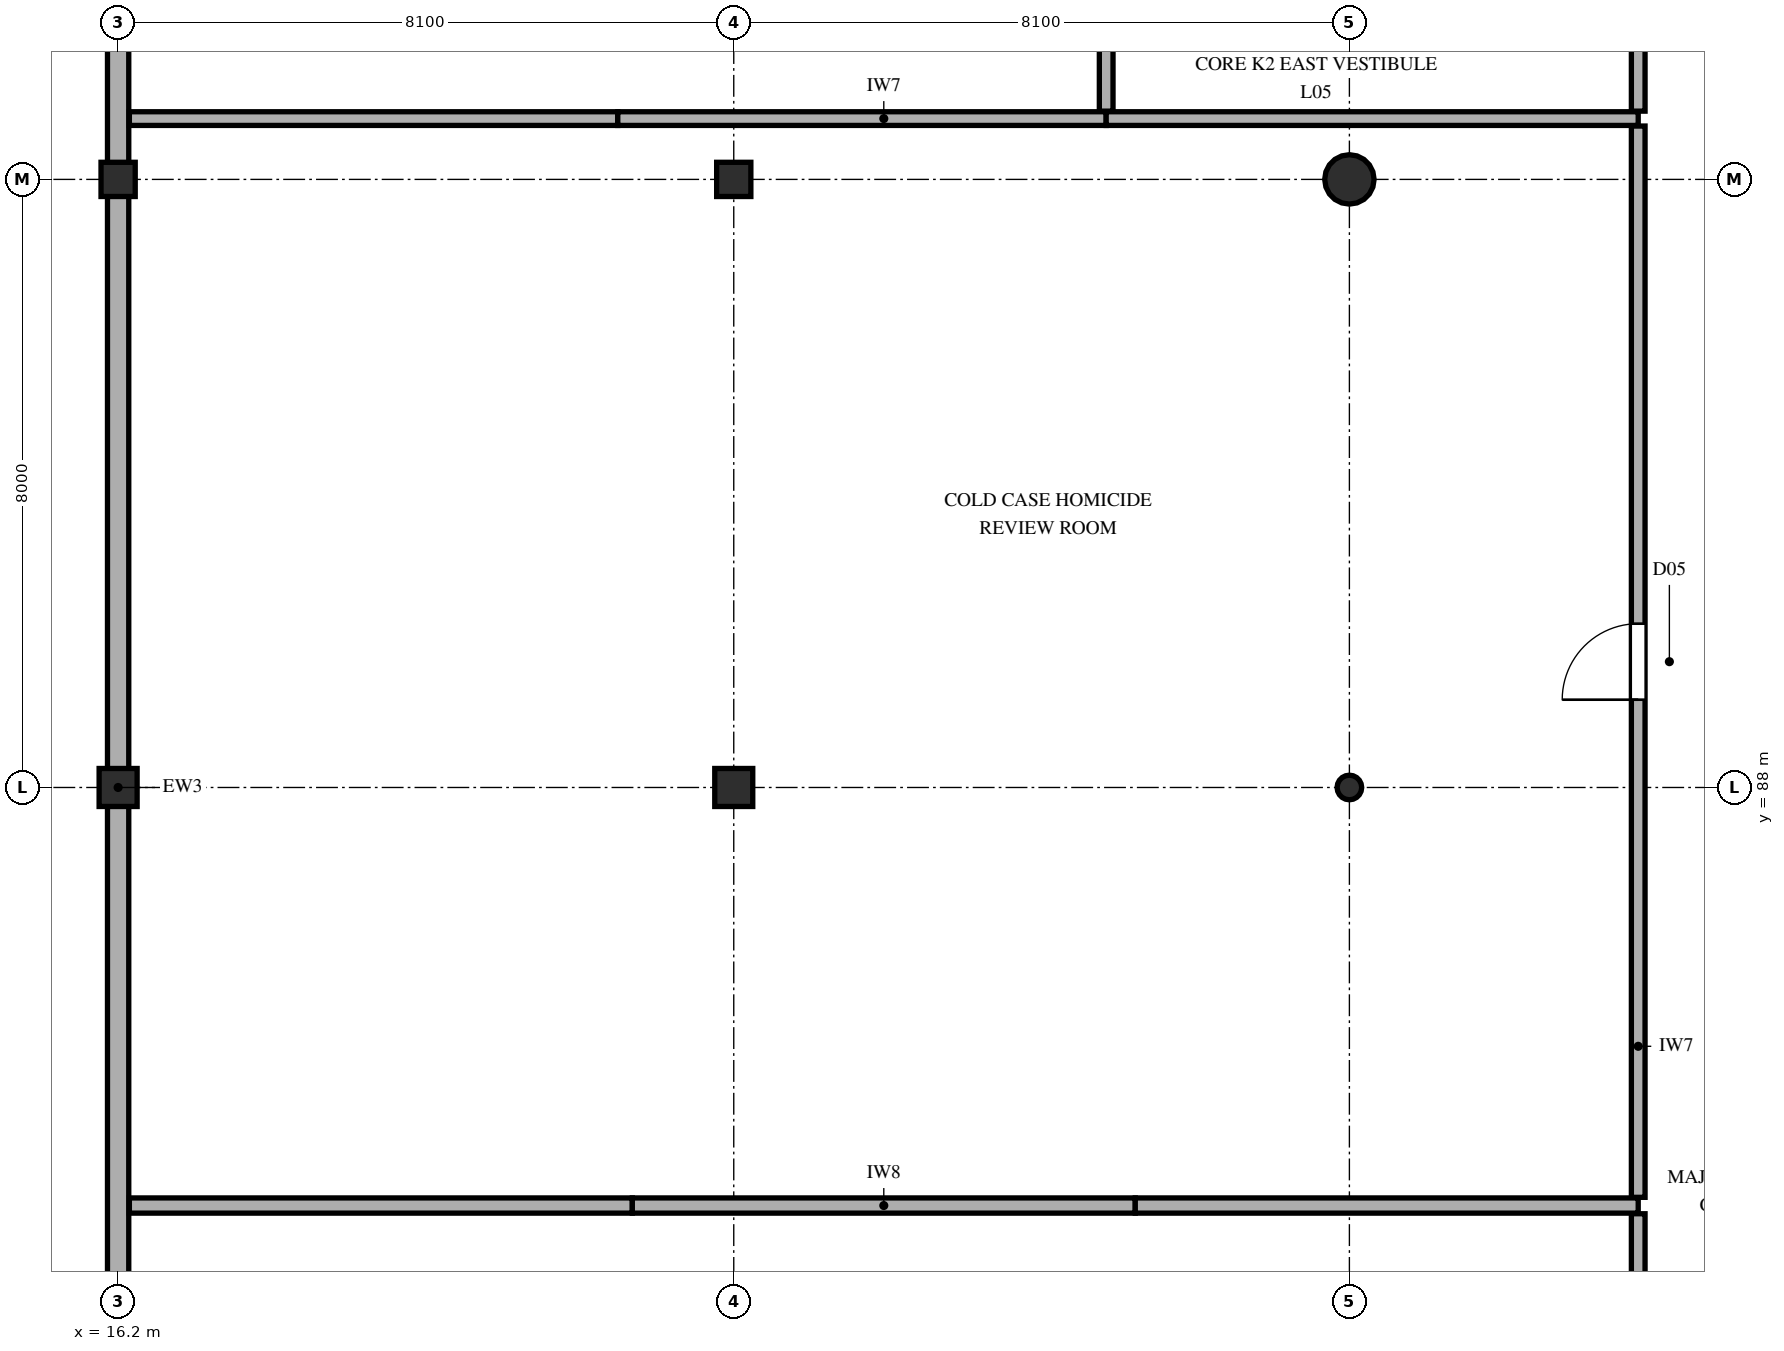
"""IFC4 building model, lengths in metres.
Left out: names, types, materials, properties, quantities, classifications, styles, units other than length and angle.
Written with IfcOpenShell. Run it as: python <this file> out.ifc"""

import sys

from ifc_helpers import new_model, si_unit, direction, frame, frame_2d, origin, origin_2d, place, context, subcontext, project, spatial, rectangle, circle, hollow_circle, extrude, element, fill, save


model = new_model("IFC4")
c1 = context("Model", 3, precision=1e-05, world=origin(), true_north=direction((0.0, 1.0)))
c2 = subcontext(c1, "Body", "Model", "MODEL_VIEW")
j1 = project(units=[si_unit("LENGTHUNIT", "METRE"), si_unit("PLANEANGLEUNIT", "RADIAN")], contexts=[c1])
p1 = place(None, origin())
s1 = spatial("IfcSite", under=j1, at=p1, CompositionType="ELEMENT")
p2 = place(p1, origin())
s2 = spatial("IfcBuilding", under=s1, at=p2, CompositionType="ELEMENT")
p3 = place(p2, frame((0.0, 0.0, 24.9)))
s3 = spatial("IfcBuildingStorey", under=s2, at=p3, CompositionType="ELEMENT", Elevation=24.9)
p4 = place(p3, frame((16.2, 88.0, 0.0), z_axis=(0.0, 0.0, 1.0), x_axis=(1.0, 0.0, 0.0)))
e1 = element("IfcColumn", 1, at=p4, inside=s3, PredefinedType="COLUMN", context=c2, shape_type="SweptSolid", body=[
    extrude(rectangle(XDim=0.5, YDim=0.5, at=origin_2d()), origin(), (0.0, 0.0, 1.0), 4.2),
])
p5 = place(p3, frame((16.2, 96.0, 0.0), z_axis=(0.0, 0.0, 1.0), x_axis=(1.0, 0.0, 0.0)))
e2 = element("IfcColumn", 2, at=p5, inside=s3, PredefinedType="COLUMN", context=c2, shape_type="SweptSolid", body=[
    extrude(rectangle(XDim=0.45, YDim=0.45, at=origin_2d()), origin(), (0.0, 0.0, 1.0), 4.2),
])
p6 = place(p3, frame((24.3, 88.0, 0.0), z_axis=(0.0, 0.0, 1.0), x_axis=(1.0, 0.0, 0.0)))
e3 = element("IfcColumn", 3, at=p6, inside=s3, PredefinedType="COLUMN", context=c2, shape_type="SweptSolid", body=[
    extrude(rectangle(XDim=0.5, YDim=0.5, at=origin_2d()), origin(), (0.0, 0.0, 1.0), 4.2),
])
p7 = place(p3, frame((24.3, 96.0, 0.0), z_axis=(0.0, 0.0, 1.0), x_axis=(1.0, 0.0, 0.0)))
e4 = element("IfcColumn", 4, at=p7, inside=s3, PredefinedType="COLUMN", context=c2, shape_type="SweptSolid", body=[
    extrude(rectangle(XDim=0.45, YDim=0.45, at=origin_2d()), origin(), (0.0, 0.0, 1.0), 4.2),
])
p8 = place(p3, frame((32.4, 88.0, 0.0), z_axis=(0.0, 0.0, 1.0), x_axis=(1.0, 0.0, 0.0)))
e5 = element("IfcColumn", 5, at=p8, inside=s3, PredefinedType="COLUMN", context=c2, shape_type="SweptSolid", body=[
    extrude(hollow_circle(Radius=0.162, WallThickness=0.013, at=origin_2d()), origin(), (0.0, 0.0, 1.0), 4.2),
])
p9 = place(p3, frame((32.4, 96.0, 0.0), z_axis=(0.0, 0.0, 1.0), x_axis=(1.0, 0.0, 0.0)))
e6 = element("IfcColumn", 6, at=p9, inside=s3, PredefinedType="COLUMN", context=c2, shape_type="SweptSolid", body=[
    extrude(circle(Radius=0.325, at=origin_2d()), origin(), (0.0, 0.0, 1.0), 4.2),
])
p10 = place(p3, frame((16.2, 112.0, 0.0), z_axis=(0.0, 0.0, 1.0), x_axis=(0.0, -1.0, 0.0)))
e7 = element("IfcWall", 7, at=p10, inside=s3, PredefinedType="SOLIDWALL", context=c2, shape_type="SweptSolid", body=[
    extrude(rectangle(XDim=16.0, YDim=0.28, at=frame_2d((8.0, 0.0))), origin(), (0.0, 0.0, 1.0), 3.452),
])
p11 = place(p3, frame((16.2, 96.0, 0.0), z_axis=(0.0, 0.0, 1.0), x_axis=(0.0, -1.0, 0.0)))
e8 = element("IfcWall", 8, at=p11, inside=s3, PredefinedType="SOLIDWALL", context=c2, shape_type="SweptSolid", body=[
    extrude(rectangle(XDim=16.0, YDim=0.28, at=frame_2d((8.0, 0.0))), origin(), (0.0, 0.0, 1.0), 3.489),
])
for number, where, z_axis, x_axis in (
    (9, (16.348, 82.5, 0.0), (0.0, 0.0, 1.0), (1.0, 0.0, 0.0)),
    (10, (22.965, 82.5, 0.0), (0.0, 0.0, 1.0), (1.0, 0.0, 0.0)),
):
    element("IfcWall", number, at=place(p3, frame(where, z_axis=z_axis, x_axis=x_axis)), inside=s3, PredefinedType="PARTITIONING", context=c2, shape_type="SweptSolid", body=[
        extrude(rectangle(XDim=6.617, YDim=0.2, at=frame_2d((3.309, 0.0))), origin(), (0.0, 0.0, 1.0), 3.96),
    ])
p12 = place(p3, frame((29.583, 82.5, 0.0), z_axis=(0.0, 0.0, 1.0), x_axis=(1.0, 0.0, 0.0)))
e11 = element("IfcWall", 11, at=p12, inside=s3, PredefinedType="PARTITIONING", context=c2, shape_type="SweptSolid", body=[
    extrude(rectangle(XDim=6.617, YDim=0.2, at=frame_2d((3.309, 0.0))), origin(), (0.0, 0.0, 1.0), 3.96),
])
for number, where, z_axis, x_axis in (
    (12, (16.348, 96.8, 0.0), (0.0, 0.0, 1.0), (1.0, 0.0, 0.0)),
    (13, (22.774, 96.8, 0.0), (0.0, 0.0, 1.0), (1.0, 0.0, 0.0)),
):
    element("IfcWall", number, at=place(p3, frame(where, z_axis=z_axis, x_axis=x_axis)), inside=s3, PredefinedType="PARTITIONING", context=c2, shape_type="SweptSolid", body=[
        extrude(rectangle(XDim=6.426, YDim=0.18, at=frame_2d((3.213, 0.0))), origin(), (0.0, 0.0, 1.0), 3.96),
    ])
p13 = place(p3, frame((29.2, 96.8, 0.0), z_axis=(0.0, 0.0, 1.0), x_axis=(1.0, 0.0, 0.0)))
e14 = element("IfcWall", 14, at=p13, inside=s3, PredefinedType="PARTITIONING", context=c2, shape_type="SweptSolid", body=[
    extrude(rectangle(XDim=7.0, YDim=0.18, at=frame_2d((3.5, 0.0))), origin(), (0.0, 0.0, 1.0), 3.96),
])
p14 = place(p3, frame((29.2, 96.898, 0.0), z_axis=(0.0, 0.0, 1.0), x_axis=(0.0, 1.0, 0.0)))
e15 = element("IfcWall", 15, at=p14, inside=s3, PredefinedType="PARTITIONING", context=c2, shape_type="SweptSolid", body=[
    extrude(rectangle(XDim=3.269, YDim=0.18, at=frame_2d((1.635, 0.0))), origin(), (0.0, 0.0, 1.0), 3.96),
])
p15 = place(p14, frame((1.034, 0.0, 0.0)))
e16 = element("IfcOpeningElement", 16, at=p15, cuts=e15, PredefinedType="OPENING", context=c2, shape_type="SweptSolid", body=[
    extrude(rectangle(XDim=1.2, YDim=2.2, at=frame_2d((0.6, 1.1))), frame((0.0, 0.1, 0.0), z_axis=(0.0, -1.0, 0.0), x_axis=(1.0, 0.0, 0.0)), (0.0, 0.0, 1.0), 0.2),
])
p16 = place(p3, frame((36.2, 68.888, 0.0), z_axis=(0.0, 0.0, 1.0), x_axis=(0.0, 1.0, 0.0)))
e17 = element("IfcWall", 17, at=p16, inside=s3, PredefinedType="PARTITIONING", context=c2, shape_type="SweptSolid", body=[
    extrude(rectangle(XDim=13.504, YDim=0.18, at=frame_2d((6.752, 0.0))), origin(), (0.0, 0.0, 1.0), 3.545),
])
p17 = place(p16, frame((6.202, 0.0, 0.0)))
e18 = element("IfcOpeningElement", 18, at=p17, cuts=e17, PredefinedType="OPENING", context=c2, shape_type="SweptSolid", body=[
    extrude(rectangle(XDim=1.1, YDim=2.2, at=frame_2d((0.55, 1.1))), frame((0.0, 0.1, 0.0), z_axis=(0.0, -1.0, 0.0), x_axis=(1.0, 0.0, 0.0)), (0.0, 0.0, 1.0), 0.2),
])
p18 = place(p3, frame((36.2, 82.608, 0.0), z_axis=(0.0, 0.0, 1.0), x_axis=(0.0, 1.0, 0.0)))
e19 = element("IfcWall", 19, at=p18, inside=s3, PredefinedType="PARTITIONING", context=c2, shape_type="SweptSolid", body=[
    extrude(rectangle(XDim=14.094, YDim=0.18, at=frame_2d((7.047, 0.0))), origin(), (0.0, 0.0, 1.0), 3.605),
])
p19 = place(p18, frame((6.547, 0.0, 0.0)))
e20 = element("IfcOpeningElement", 20, at=p19, cuts=e19, PredefinedType="OPENING", context=c2, shape_type="SweptSolid", body=[
    extrude(rectangle(XDim=1.0, YDim=2.2, at=frame_2d((0.5, 1.1))), frame((0.0, 0.1, 0.0), z_axis=(0.0, -1.0, 0.0), x_axis=(1.0, 0.0, 0.0)), (0.0, 0.0, 1.0), 0.2),
])
p20 = place(p3, frame((36.2, 96.898, 0.0), z_axis=(0.0, 0.0, 1.0), x_axis=(0.0, 1.0, 0.0)))
e21 = element("IfcWall", 21, at=p20, inside=s3, PredefinedType="PARTITIONING", context=c2, shape_type="SweptSolid", body=[
    extrude(rectangle(XDim=3.404, YDim=0.18, at=frame_2d((1.702, 0.0))), origin(), (0.0, 0.0, 1.0), 3.649),
])
p21 = place(p20, frame((1.152, 0.0, 0.0)))
e22 = element("IfcOpeningElement", 22, at=p21, cuts=e21, PredefinedType="OPENING", context=c2, shape_type="SweptSolid", body=[
    extrude(rectangle(XDim=1.1, YDim=2.2, at=frame_2d((0.55, 1.1))), frame((0.0, 0.1, 0.0), z_axis=(0.0, -1.0, 0.0), x_axis=(1.0, 0.0, 0.0)), (0.0, 0.0, 1.0), 0.2),
])
p22 = place(p19, origin())
e23 = element("IfcDoor", 23, at=p22, inside=s3, OperationType="SINGLE_SWING_LEFT", PredefinedType="DOOR", context=c2, shape_type="SweptSolid", body=[
    extrude(rectangle(XDim=1.0, YDim=2.2, at=frame_2d((0.5, 1.1))), frame((0.0, 0.025, 0.0), z_axis=(0.0, -1.0, 0.0), x_axis=(1.0, 0.0, 0.0)), (0.0, 0.0, 1.0), 0.05),
])
fill(e20, e23)
save(model, sys.argv[1])
